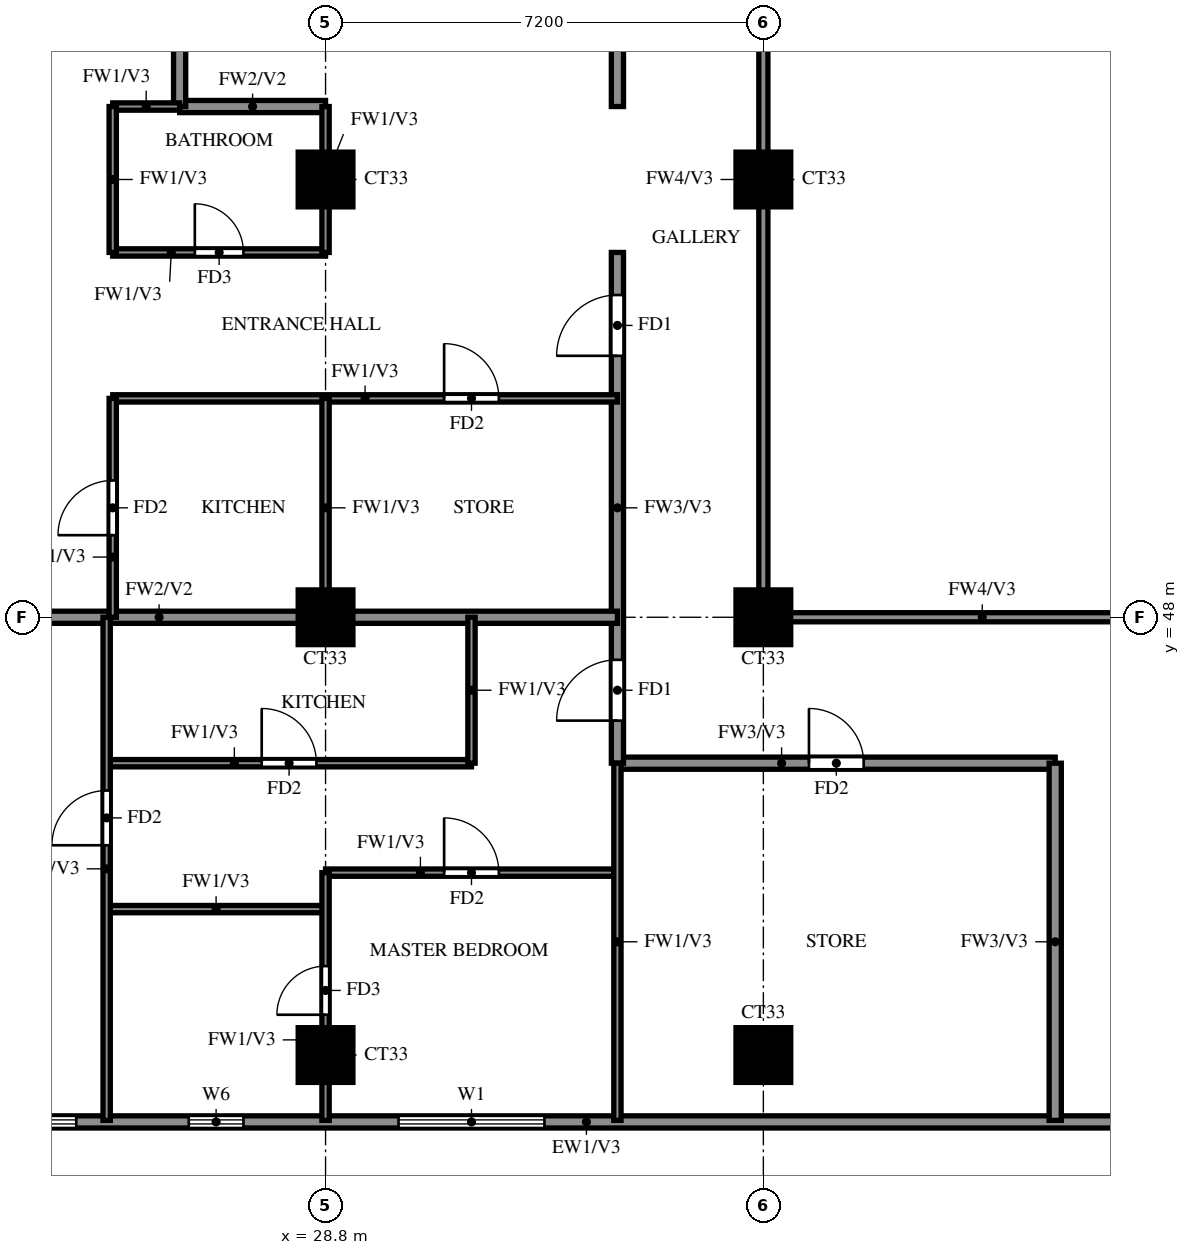
"""IFC4 building model, lengths in metres.
Left out: names, types, materials, properties, quantities, classifications, styles, units other than length and angle.
Written with IfcOpenShell. Run it as: python <this file> out.ifc"""

import sys

from ifc_helpers import new_model, si_unit, direction, frame, frame_2d, origin, origin_2d, place, context, subcontext, project, spatial, rectangle, extrude, source, transform, mapped, element, fill, save


model = new_model("IFC4")
c1 = context("Model", 3, precision=1e-05, world=origin(), true_north=direction((0.0, 1.0)))
c2 = subcontext(c1, "Body", "Model", "MODEL_VIEW")
j1 = project(units=[si_unit("LENGTHUNIT", "METRE"), si_unit("PLANEANGLEUNIT", "RADIAN")], contexts=[c1])
p1 = place(None, origin())
s1 = spatial("IfcSite", under=j1, at=p1, CompositionType="ELEMENT")
p2 = place(p1, origin())
s2 = spatial("IfcBuilding", under=s1, at=p2, CompositionType="ELEMENT")
p3 = place(p2, frame((0.0, 0.0, 211.5)))
s3 = spatial("IfcBuildingStorey", under=s2, at=p3, CompositionType="ELEMENT", Elevation=211.5)
m1 = source(origin(), c2, "Body", "SweptSolid", [
    extrude(rectangle(XDim=0.9, YDim=0.9, at=origin_2d()), origin(), (0.0, 0.0, 1.0), 3.22),
])
for number, where, z_axis, x_axis in (
    (1, (28.8, 40.8, 0.0), (0.0, 0.0, 1.0), (1.0, 0.0, 0.0)),
    (2, (36.0, 40.8, 0.0), (0.0, 0.0, 1.0), (1.0, 0.0, 0.0)),
    (3, (28.8, 48.0, 0.0), (0.0, 0.0, 1.0), (1.0, 0.0, 0.0)),
    (4, (36.0, 48.0, 0.0), (0.0, 0.0, 1.0), (1.0, 0.0, 0.0)),
    (5, (28.8, 55.2, 0.0), (0.0, 0.0, 1.0), (1.0, 0.0, 0.0)),
    (6, (36.0, 55.2, 0.0), (0.0, 0.0, 1.0), (1.0, 0.0, 0.0)),
):
    element("IfcColumn", number, at=place(p3, frame(where, z_axis=z_axis, x_axis=x_axis)), inside=s3, PredefinedType="COLUMN", context=c2, shape_type="MappedRepresentation", body=[
        mapped(m1, transform((0.0, 0.0, 0.0))),
    ])
p4 = place(p3, frame((22.2, 39.7, 0.0), z_axis=(0.0, 0.0, 1.0), x_axis=(1.0, 0.0, 0.0)))
e7 = element("IfcWall", 7, at=p4, inside=s3, PredefinedType="SOLIDWALL", context=c2, shape_type="SweptSolid", body=[
    extrude(rectangle(XDim=19.8, YDim=0.2, at=frame_2d((9.9, 0.0))), origin(), (0.0, 0.0, 1.0), 3.22),
])
p5 = place(p4, frame((0.7, 0.0, 0.6)))
e8 = element("IfcOpeningElement", 8, at=p5, cuts=e7, PredefinedType="OPENING", context=c2, shape_type="SweptSolid", body=[
    extrude(rectangle(XDim=1.8, YDim=2.4, at=frame_2d((0.9, 1.2))), frame((0.0, 0.11, 0.0), z_axis=(0.0, -1.0, 0.0), x_axis=(1.0, 0.0, 0.0)), (0.0, 0.0, 1.0), 0.22),
])
p6 = place(p4, frame((7.8, 0.0, 0.6)))
e9 = element("IfcOpeningElement", 9, at=p6, cuts=e7, PredefinedType="OPENING", context=c2, shape_type="SweptSolid", body=[
    extrude(rectangle(XDim=2.4, YDim=2.4, at=frame_2d((1.2, 1.2))), frame((0.0, 0.11, 0.0), z_axis=(0.0, -1.0, 0.0), x_axis=(1.0, 0.0, 0.0)), (0.0, 0.0, 1.0), 0.22),
])
p7 = place(p4, frame((4.35, 0.0, 1.5)))
e10 = element("IfcOpeningElement", 10, at=p7, cuts=e7, PredefinedType="OPENING", context=c2, shape_type="SweptSolid", body=[
    extrude(rectangle(XDim=0.9, YDim=0.9, at=frame_2d((0.45, 0.45))), frame((0.0, 0.11, 0.0), z_axis=(0.0, -1.0, 0.0), x_axis=(1.0, 0.0, 0.0)), (0.0, 0.0, 1.0), 0.22),
])
p8 = place(p3, frame((33.6, 45.6, 0.0), z_axis=(0.0, 0.0, 1.0), x_axis=(1.0, 0.0, 0.0)))
e11 = element("IfcWall", 11, at=p8, inside=s3, PredefinedType="SOLIDWALL", context=c2, shape_type="SweptSolid", body=[
    extrude(rectangle(XDim=7.2, YDim=0.2, at=frame_2d((3.6, 0.0))), origin(), (0.0, 0.0, 1.0), 3.22),
])
p9 = place(p8, frame((3.15, 0.0, 0.0)))
e12 = element("IfcOpeningElement", 12, at=p9, cuts=e11, PredefinedType="OPENING", context=c2, shape_type="SweptSolid", body=[
    extrude(rectangle(XDim=0.9, YDim=2.1, at=frame_2d((0.45, 1.05))), frame((0.0, 0.11, 0.0), z_axis=(0.0, -1.0, 0.0), x_axis=(1.0, 0.0, 0.0)), (0.0, 0.0, 1.0), 0.22),
])
p10 = place(p3, frame((33.6, 45.6, 0.0), z_axis=(0.0, 0.0, 1.0), x_axis=(0.0, 1.0, 0.0)))
e13 = element("IfcWall", 13, at=p10, inside=s3, PredefinedType="SOLIDWALL", context=c2, shape_type="SweptSolid", body=[
    extrude(rectangle(XDim=8.4, YDim=0.2, at=frame_2d((4.2, 0.0))), origin(), (0.0, 0.0, 1.0), 3.22),
])
p11 = place(p10, frame((0.7, 0.0, 0.0)))
e14 = element("IfcOpeningElement", 14, at=p11, cuts=e13, PredefinedType="OPENING", context=c2, shape_type="SweptSolid", body=[
    extrude(rectangle(XDim=1.0, YDim=2.1, at=frame_2d((0.5, 1.05))), frame((0.0, 0.11, 0.0), z_axis=(0.0, -1.0, 0.0), x_axis=(1.0, 0.0, 0.0)), (0.0, 0.0, 1.0), 0.22),
])
p12 = place(p10, frame((6.7, 0.0, 0.0)))
e15 = element("IfcOpeningElement", 15, at=p12, cuts=e13, PredefinedType="OPENING", context=c2, shape_type="SweptSolid", body=[
    extrude(rectangle(XDim=1.0, YDim=2.1, at=frame_2d((0.5, 1.05))), frame((0.0, 0.11, 0.0), z_axis=(0.0, -1.0, 0.0), x_axis=(1.0, 0.0, 0.0)), (0.0, 0.0, 1.0), 0.22),
])
p13 = place(p3, frame((33.6, 56.4, 0.0), z_axis=(0.0, 0.0, 1.0), x_axis=(0.0, 1.0, 0.0)))
e16 = element("IfcWall", 16, at=p13, inside=s3, PredefinedType="SOLIDWALL", context=c2, shape_type="SweptSolid", body=[
    extrude(rectangle(XDim=6.0, YDim=0.2, at=frame_2d((3.0, 0.0))), origin(), (0.0, 0.0, 1.0), 3.22),
])
p14 = place(p13, frame((3.7, 0.0, 0.0)))
e17 = element("IfcOpeningElement", 17, at=p14, cuts=e16, PredefinedType="OPENING", context=c2, shape_type="SweptSolid", body=[
    extrude(rectangle(XDim=1.0, YDim=2.1, at=frame_2d((0.5, 1.05))), frame((0.0, 0.11, 0.0), z_axis=(0.0, -1.0, 0.0), x_axis=(1.0, 0.0, 0.0)), (0.0, 0.0, 1.0), 0.22),
])
p15 = place(p3, frame((40.8, 39.725, 0.0), z_axis=(0.0, 0.0, 1.0), x_axis=(0.0, 1.0, 0.0)))
e18 = element("IfcWall", 18, at=p15, inside=s3, PredefinedType="SOLIDWALL", context=c2, shape_type="SweptSolid", body=[
    extrude(rectangle(XDim=5.875, YDim=0.2, at=frame_2d((2.938, 0.0))), origin(), (0.0, 0.0, 1.0), 3.22),
])
p16 = place(p3, frame((18.525, 48.0, 0.0), z_axis=(0.0, 0.0, 1.0), x_axis=(1.0, 0.0, 0.0)))
e19 = element("IfcWall", 19, at=p16, inside=s3, PredefinedType="SOLIDWALL", context=c2, shape_type="SweptSolid", body=[
    extrude(rectangle(XDim=15.075, YDim=0.2, at=frame_2d((7.538, 0.0))), origin(), (0.0, 0.0, 1.0), 3.22),
])
for number, where, z_axis, x_axis in (
    (20, (26.4, 56.4, 0.0), (0.0, 0.0, 1.0), (1.0, 0.0, 0.0)),
    (21, (26.4, 56.4, 0.0), (0.0, 0.0, 1.0), (0.0, 1.0, 0.0)),
):
    element("IfcWall", number, at=place(p3, frame(where, z_axis=z_axis, x_axis=x_axis)), inside=s3, PredefinedType="SOLIDWALL", context=c2, shape_type="SweptSolid", body=[
        extrude(rectangle(XDim=2.4, YDim=0.2, at=frame_2d((1.2, 0.0))), origin(), (0.0, 0.0, 1.0), 3.22),
    ])
p17 = place(p3, frame((25.2, 43.2, 0.0), z_axis=(0.0, 0.0, 1.0), x_axis=(1.0, 0.0, 0.0)))
e22 = element("IfcWall", 22, at=p17, inside=s3, PredefinedType="PARTITIONING", context=c2, shape_type="SweptSolid", body=[
    extrude(rectangle(XDim=3.6, YDim=0.12, at=frame_2d((1.8, 0.0))), origin(), (0.0, 0.0, 1.0), 3.22),
])
p18 = place(p3, frame((28.8, 43.8, 0.0), z_axis=(0.0, 0.0, 1.0), x_axis=(1.0, 0.0, 0.0)))
e23 = element("IfcWall", 23, at=p18, inside=s3, PredefinedType="PARTITIONING", context=c2, shape_type="SweptSolid", body=[
    extrude(rectangle(XDim=4.8, YDim=0.12, at=frame_2d((2.4, 0.0))), origin(), (0.0, 0.0, 1.0), 3.22),
])
p19 = place(p18, frame((1.95, 0.0, 0.0)))
e24 = element("IfcOpeningElement", 24, at=p19, cuts=e23, PredefinedType="OPENING", context=c2, shape_type="SweptSolid", body=[
    extrude(rectangle(XDim=0.9, YDim=2.1, at=frame_2d((0.45, 1.05))), frame((0.0, 0.07, 0.0), z_axis=(0.0, -1.0, 0.0), x_axis=(1.0, 0.0, 0.0)), (0.0, 0.0, 1.0), 0.14),
])
p20 = place(p3, frame((25.2, 45.6, 0.0), z_axis=(0.0, 0.0, 1.0), x_axis=(1.0, 0.0, 0.0)))
e25 = element("IfcWall", 25, at=p20, inside=s3, PredefinedType="PARTITIONING", context=c2, shape_type="SweptSolid", body=[
    extrude(rectangle(XDim=6.0, YDim=0.12, at=frame_2d((3.0, 0.0))), origin(), (0.0, 0.0, 1.0), 3.22),
])
p21 = place(p20, frame((2.55, 0.0, 0.0)))
e26 = element("IfcOpeningElement", 26, at=p21, cuts=e25, PredefinedType="OPENING", context=c2, shape_type="SweptSolid", body=[
    extrude(rectangle(XDim=0.9, YDim=2.1, at=frame_2d((0.45, 1.05))), frame((0.0, 0.07, 0.0), z_axis=(0.0, -1.0, 0.0), x_axis=(1.0, 0.0, 0.0)), (0.0, 0.0, 1.0), 0.14),
])
p22 = place(p3, frame((25.3, 51.6, 0.0), z_axis=(0.0, 0.0, 1.0), x_axis=(1.0, 0.0, 0.0)))
e27 = element("IfcWall", 27, at=p22, inside=s3, PredefinedType="PARTITIONING", context=c2, shape_type="SweptSolid", body=[
    extrude(rectangle(XDim=8.3, YDim=0.12, at=frame_2d((4.15, 0.0))), origin(), (0.0, 0.0, 1.0), 3.22),
])
p23 = place(p22, frame((5.45, 0.0, 0.0)))
e28 = element("IfcOpeningElement", 28, at=p23, cuts=e27, PredefinedType="OPENING", context=c2, shape_type="SweptSolid", body=[
    extrude(rectangle(XDim=0.9, YDim=2.1, at=frame_2d((0.45, 1.05))), frame((0.0, 0.07, 0.0), z_axis=(0.0, -1.0, 0.0), x_axis=(1.0, 0.0, 0.0)), (0.0, 0.0, 1.0), 0.14),
])
p24 = place(p3, frame((25.3, 54.0, 0.0), z_axis=(0.0, 0.0, 1.0), x_axis=(1.0, 0.0, 0.0)))
e29 = element("IfcWall", 29, at=p24, inside=s3, PredefinedType="PARTITIONING", context=c2, shape_type="SweptSolid", body=[
    extrude(rectangle(XDim=3.5, YDim=0.12, at=frame_2d((1.75, 0.0))), origin(), (0.0, 0.0, 1.0), 3.22),
])
p25 = place(p24, frame((1.35, 0.0, 0.0)))
e30 = element("IfcOpeningElement", 30, at=p25, cuts=e29, PredefinedType="OPENING", context=c2, shape_type="SweptSolid", body=[
    extrude(rectangle(XDim=0.8, YDim=2.1, at=frame_2d((0.4, 1.05))), frame((0.0, 0.07, 0.0), z_axis=(0.0, -1.0, 0.0), x_axis=(1.0, 0.0, 0.0)), (0.0, 0.0, 1.0), 0.14),
])
p26 = place(p3, frame((25.3, 56.4, 0.0), z_axis=(0.0, 0.0, 1.0), x_axis=(1.0, 0.0, 0.0)))
e31 = element("IfcWall", 31, at=p26, inside=s3, PredefinedType="PARTITIONING", context=c2, shape_type="SweptSolid", body=[
    extrude(rectangle(XDim=1.1, YDim=0.12, at=frame_2d((0.55, 0.0))), origin(), (0.0, 0.0, 1.0), 3.22),
])
p27 = place(p3, frame((25.2, 39.725, 0.0), z_axis=(0.0, 0.0, 1.0), x_axis=(0.0, 1.0, 0.0)))
e32 = element("IfcWall", 32, at=p27, inside=s3, PredefinedType="PARTITIONING", context=c2, shape_type="SweptSolid", body=[
    extrude(rectangle(XDim=8.275, YDim=0.12, at=frame_2d((4.137, 0.0))), origin(), (0.0, 0.0, 1.0), 3.22),
])
p28 = place(p27, frame((4.525, 0.0, 0.0)))
e33 = element("IfcOpeningElement", 33, at=p28, cuts=e32, PredefinedType="OPENING", context=c2, shape_type="SweptSolid", body=[
    extrude(rectangle(XDim=0.9, YDim=2.1, at=frame_2d((0.45, 1.05))), frame((0.0, 0.07, 0.0), z_axis=(0.0, -1.0, 0.0), x_axis=(1.0, 0.0, 0.0)), (0.0, 0.0, 1.0), 0.14),
])
p29 = place(p3, frame((25.3, 48.0, 0.0), z_axis=(0.0, 0.0, 1.0), x_axis=(0.0, 1.0, 0.0)))
e34 = element("IfcWall", 34, at=p29, inside=s3, PredefinedType="PARTITIONING", context=c2, shape_type="SweptSolid", body=[
    extrude(rectangle(XDim=3.6, YDim=0.12, at=frame_2d((1.8, 0.0))), origin(), (0.0, 0.0, 1.0), 3.22),
])
p30 = place(p29, frame((1.35, 0.0, 0.0)))
e35 = element("IfcOpeningElement", 35, at=p30, cuts=e34, PredefinedType="OPENING", context=c2, shape_type="SweptSolid", body=[
    extrude(rectangle(XDim=0.9, YDim=2.1, at=frame_2d((0.45, 1.05))), frame((0.0, 0.07, 0.0), z_axis=(0.0, -1.0, 0.0), x_axis=(1.0, 0.0, 0.0)), (0.0, 0.0, 1.0), 0.14),
])
p31 = place(p3, frame((25.3, 54.0, 0.0), z_axis=(0.0, 0.0, 1.0), x_axis=(0.0, 1.0, 0.0)))
e36 = element("IfcWall", 36, at=p31, inside=s3, PredefinedType="PARTITIONING", context=c2, shape_type="SweptSolid", body=[
    extrude(rectangle(XDim=2.4, YDim=0.12, at=frame_2d((1.2, 0.0))), origin(), (0.0, 0.0, 1.0), 3.22),
])
p32 = place(p3, frame((28.8, 39.725, 0.0), z_axis=(0.0, 0.0, 1.0), x_axis=(0.0, 1.0, 0.0)))
e37 = element("IfcWall", 37, at=p32, inside=s3, PredefinedType="PARTITIONING", context=c2, shape_type="SweptSolid", body=[
    extrude(rectangle(XDim=4.075, YDim=0.12, at=frame_2d((2.038, 0.0))), origin(), (0.0, 0.0, 1.0), 3.22),
])
p33 = place(p32, frame((1.738, 0.0, 0.0)))
e38 = element("IfcOpeningElement", 38, at=p33, cuts=e37, PredefinedType="OPENING", context=c2, shape_type="SweptSolid", body=[
    extrude(rectangle(XDim=0.8, YDim=2.1, at=frame_2d((0.4, 1.05))), frame((0.0, 0.07, 0.0), z_axis=(0.0, -1.0, 0.0), x_axis=(1.0, 0.0, 0.0)), (0.0, 0.0, 1.0), 0.14),
])
p34 = place(p3, frame((28.8, 48.0, 0.0), z_axis=(0.0, 0.0, 1.0), x_axis=(0.0, 1.0, 0.0)))
e39 = element("IfcWall", 39, at=p34, inside=s3, PredefinedType="PARTITIONING", context=c2, shape_type="SweptSolid", body=[
    extrude(rectangle(XDim=3.6, YDim=0.12, at=frame_2d((1.8, 0.0))), origin(), (0.0, 0.0, 1.0), 3.22),
])
for number, where, z_axis, x_axis in (
    (40, (28.8, 54.0, 0.0), (0.0, 0.0, 1.0), (0.0, 1.0, 0.0)),
    (41, (31.2, 45.6, 0.0), (0.0, 0.0, 1.0), (0.0, 1.0, 0.0)),
):
    element("IfcWall", number, at=place(p3, frame(where, z_axis=z_axis, x_axis=x_axis)), inside=s3, PredefinedType="PARTITIONING", context=c2, shape_type="SweptSolid", body=[
        extrude(rectangle(XDim=2.4, YDim=0.12, at=frame_2d((1.2, 0.0))), origin(), (0.0, 0.0, 1.0), 3.22),
    ])
p35 = place(p3, frame((33.6, 39.725, 0.0), z_axis=(0.0, 0.0, 1.0), x_axis=(0.0, 1.0, 0.0)))
e42 = element("IfcWall", 42, at=p35, inside=s3, PredefinedType="PARTITIONING", context=c2, shape_type="SweptSolid", body=[
    extrude(rectangle(XDim=5.875, YDim=0.12, at=frame_2d((2.938, 0.0))), origin(), (0.0, 0.0, 1.0), 3.22),
])
p36 = place(p3, frame((36.0, 48.0, 0.0), z_axis=(0.0, 0.0, 1.0), x_axis=(1.0, 0.0, 0.0)))
e43 = element("IfcWall", 43, at=p36, inside=s3, PredefinedType="SOLIDWALL", context=c2, shape_type="SweptSolid", body=[
    extrude(rectangle(XDim=7.2, YDim=0.15, at=frame_2d((3.6, 0.0))), origin(), (0.0, 0.0, 1.0), 2.32),
])
p37 = place(p3, frame((36.0, 48.0, 0.0), z_axis=(0.0, 0.0, 1.0), x_axis=(0.0, 1.0, 0.0)))
e44 = element("IfcWall", 44, at=p37, inside=s3, PredefinedType="SOLIDWALL", context=c2, shape_type="SweptSolid", body=[
    extrude(rectangle(XDim=14.4, YDim=0.15, at=frame_2d((7.2, 0.0))), origin(), (0.0, 0.0, 1.0), 2.32),
])
p38 = place(p5, origin())
e45 = element("IfcWindow", 45, at=p38, inside=s3, PartitioningType="DOUBLE_PANEL_VERTICAL", PredefinedType="WINDOW", context=c2, shape_type="SweptSolid", body=[
    extrude(rectangle(XDim=1.8, YDim=2.4, at=frame_2d((0.9, 1.2))), frame((0.0, 0.03, 0.0), z_axis=(0.0, -1.0, 0.0), x_axis=(1.0, 0.0, 0.0)), (0.0, 0.0, 1.0), 0.06),
])
fill(e8, e45)
p39 = place(p6, origin())
e46 = element("IfcWindow", 46, at=p39, inside=s3, PartitioningType="DOUBLE_PANEL_VERTICAL", PredefinedType="WINDOW", context=c2, shape_type="SweptSolid", body=[
    extrude(rectangle(XDim=2.4, YDim=2.4, at=frame_2d((1.2, 1.2))), frame((0.0, 0.03, 0.0), z_axis=(0.0, -1.0, 0.0), x_axis=(1.0, 0.0, 0.0)), (0.0, 0.0, 1.0), 0.06),
])
fill(e9, e46)
p40 = place(p7, origin())
e47 = element("IfcWindow", 47, at=p40, inside=s3, PartitioningType="SINGLE_PANEL", PredefinedType="WINDOW", context=c2, shape_type="SweptSolid", body=[
    extrude(rectangle(XDim=0.9, YDim=0.9, at=frame_2d((0.45, 0.45))), frame((0.0, 0.03, 0.0), z_axis=(0.0, -1.0, 0.0), x_axis=(1.0, 0.0, 0.0)), (0.0, 0.0, 1.0), 0.06),
])
fill(e10, e47)
p41 = place(p11, origin())
e48 = element("IfcDoor", 48, at=p41, inside=s3, OperationType="SINGLE_SWING_LEFT", PredefinedType="DOOR", context=c2, shape_type="SweptSolid", body=[
    extrude(rectangle(XDim=1.0, YDim=2.1, at=frame_2d((0.5, 1.05))), frame((0.0, 0.025, 0.0), z_axis=(0.0, -1.0, 0.0), x_axis=(1.0, 0.0, 0.0)), (0.0, 0.0, 1.0), 0.05),
])
fill(e14, e48)
p42 = place(p28, origin())
e49 = element("IfcDoor", 49, at=p42, inside=s3, OperationType="SINGLE_SWING_RIGHT", PredefinedType="DOOR", context=c2, shape_type="SweptSolid", body=[
    extrude(rectangle(XDim=0.9, YDim=2.1, at=frame_2d((0.45, 1.05))), frame((0.0, 0.025, 0.0), z_axis=(0.0, -1.0, 0.0), x_axis=(1.0, 0.0, 0.0)), (0.0, 0.0, 1.0), 0.05),
])
fill(e33, e49)
p43 = place(p19, origin())
e50 = element("IfcDoor", 50, at=p43, inside=s3, OperationType="SINGLE_SWING_LEFT", PredefinedType="DOOR", context=c2, shape_type="SweptSolid", body=[
    extrude(rectangle(XDim=0.9, YDim=2.1, at=frame_2d((0.45, 1.05))), frame((0.0, 0.025, 0.0), z_axis=(0.0, -1.0, 0.0), x_axis=(1.0, 0.0, 0.0)), (0.0, 0.0, 1.0), 0.05),
])
fill(e24, e50)
p44 = place(p33, origin())
e51 = element("IfcDoor", 51, at=p44, inside=s3, OperationType="SINGLE_SWING_RIGHT", PredefinedType="DOOR", context=c2, shape_type="SweptSolid", body=[
    extrude(rectangle(XDim=0.8, YDim=2.1, at=frame_2d((0.4, 1.05))), frame((0.0, 0.025, 0.0), z_axis=(0.0, -1.0, 0.0), x_axis=(1.0, 0.0, 0.0)), (0.0, 0.0, 1.0), 0.05),
])
fill(e38, e51)
p45 = place(p21, origin())
e52 = element("IfcDoor", 52, at=p45, inside=s3, OperationType="SINGLE_SWING_RIGHT", PredefinedType="DOOR", context=c2, shape_type="SweptSolid", body=[
    extrude(rectangle(XDim=0.9, YDim=2.1, at=frame_2d((0.45, 1.05))), frame((0.0, 0.025, 0.0), z_axis=(0.0, -1.0, 0.0), x_axis=(1.0, 0.0, 0.0)), (0.0, 0.0, 1.0), 0.05),
])
fill(e26, e52)
p46 = place(p9, origin())
e53 = element("IfcDoor", 53, at=p46, inside=s3, OperationType="SINGLE_SWING_LEFT", PredefinedType="DOOR", context=c2, shape_type="SweptSolid", body=[
    extrude(rectangle(XDim=0.9, YDim=2.1, at=frame_2d((0.45, 1.05))), frame((0.0, 0.025, 0.0), z_axis=(0.0, -1.0, 0.0), x_axis=(1.0, 0.0, 0.0)), (0.0, 0.0, 1.0), 0.05),
])
fill(e12, e53)
p47 = place(p12, origin())
e54 = element("IfcDoor", 54, at=p47, inside=s3, OperationType="SINGLE_SWING_LEFT", PredefinedType="DOOR", context=c2, shape_type="SweptSolid", body=[
    extrude(rectangle(XDim=1.0, YDim=2.1, at=frame_2d((0.5, 1.05))), frame((0.0, 0.025, 0.0), z_axis=(0.0, -1.0, 0.0), x_axis=(1.0, 0.0, 0.0)), (0.0, 0.0, 1.0), 0.05),
])
fill(e15, e54)
p48 = place(p30, origin())
e55 = element("IfcDoor", 55, at=p48, inside=s3, OperationType="SINGLE_SWING_RIGHT", PredefinedType="DOOR", context=c2, shape_type="SweptSolid", body=[
    extrude(rectangle(XDim=0.9, YDim=2.1, at=frame_2d((0.45, 1.05))), frame((0.0, 0.025, 0.0), z_axis=(0.0, -1.0, 0.0), x_axis=(1.0, 0.0, 0.0)), (0.0, 0.0, 1.0), 0.05),
])
fill(e35, e55)
p49 = place(p25, origin())
e56 = element("IfcDoor", 56, at=p49, inside=s3, OperationType="SINGLE_SWING_LEFT", PredefinedType="DOOR", context=c2, shape_type="SweptSolid", body=[
    extrude(rectangle(XDim=0.8, YDim=2.1, at=frame_2d((0.4, 1.05))), frame((0.0, 0.025, 0.0), z_axis=(0.0, -1.0, 0.0), x_axis=(1.0, 0.0, 0.0)), (0.0, 0.0, 1.0), 0.05),
])
fill(e30, e56)
p50 = place(p23, origin())
e57 = element("IfcDoor", 57, at=p50, inside=s3, OperationType="SINGLE_SWING_LEFT", PredefinedType="DOOR", context=c2, shape_type="SweptSolid", body=[
    extrude(rectangle(XDim=0.9, YDim=2.1, at=frame_2d((0.45, 1.05))), frame((0.0, 0.025, 0.0), z_axis=(0.0, -1.0, 0.0), x_axis=(1.0, 0.0, 0.0)), (0.0, 0.0, 1.0), 0.05),
])
fill(e28, e57)
save(model, sys.argv[1])
